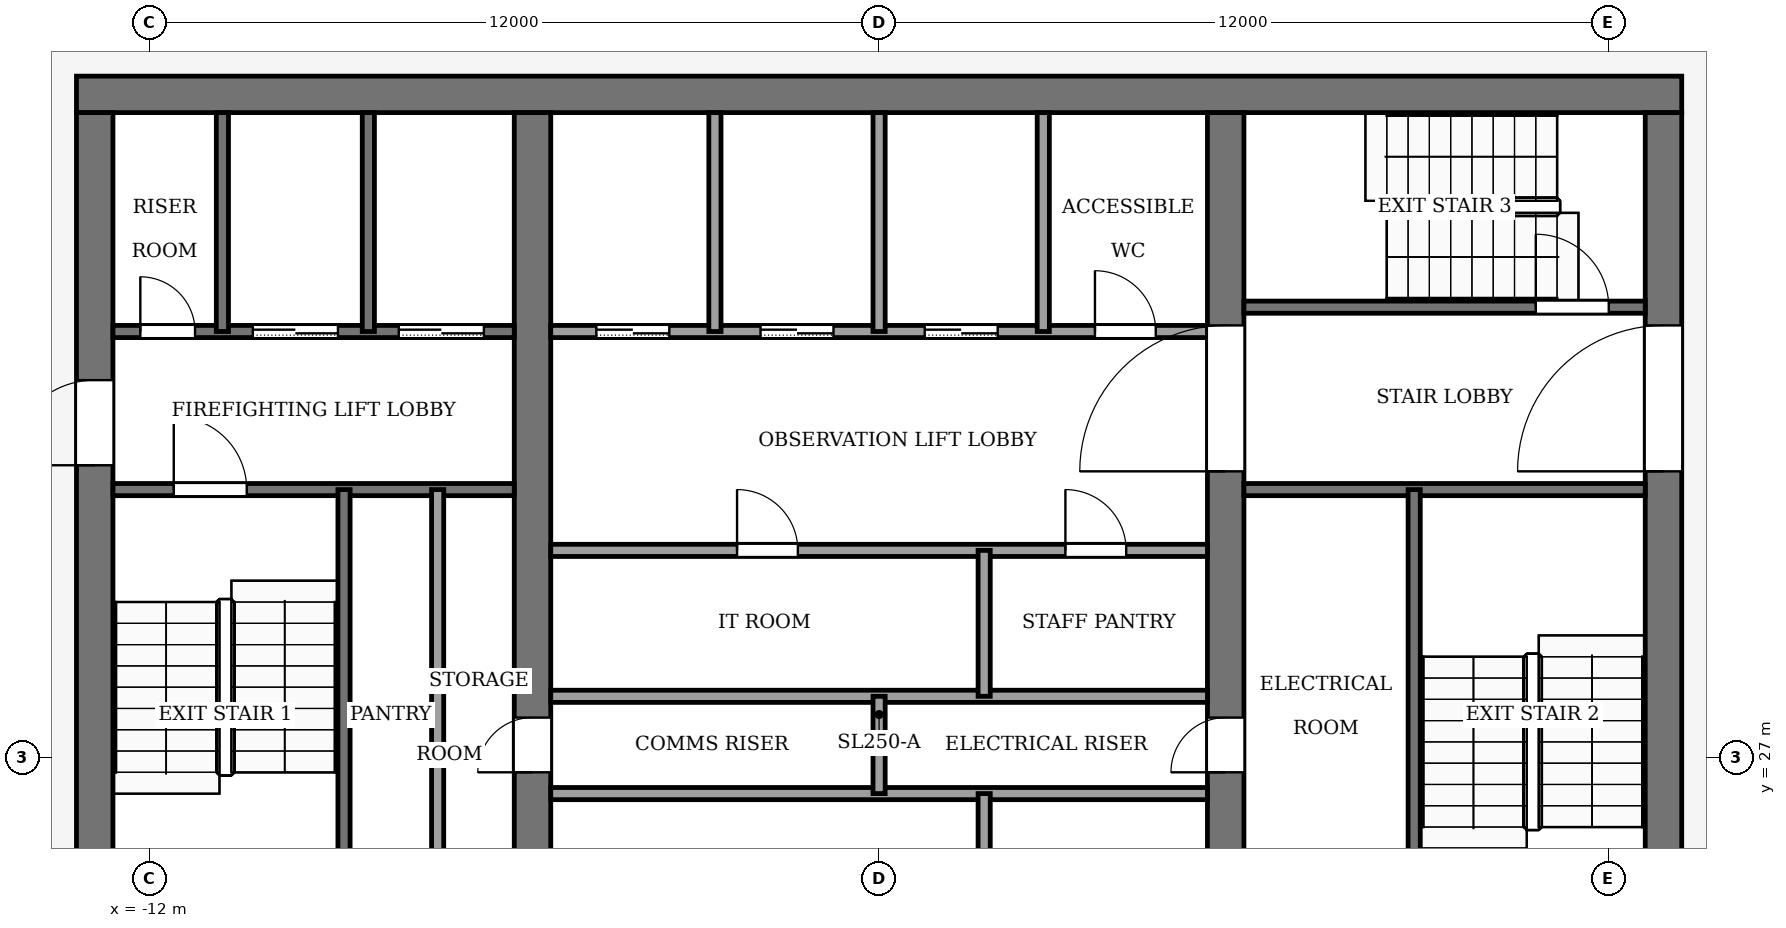
"""IFC4 building model, lengths in metres.
Left out: names, types, materials, properties, quantities, classifications, styles, units other than length and angle.
Written with IfcOpenShell. Run it as: python <this file> out.ifc"""

import sys

from ifc_helpers import new_model, si_unit, direction, frame, frame_2d, origin, place, context, subcontext, project, spatial, rectangle, extrude, element, fill, save


model = new_model("IFC4")
c1 = context("Model", 3, precision=1e-05, world=origin(), true_north=direction((0.0, 1.0)))
c2 = subcontext(c1, "Body", "Model", "MODEL_VIEW")
j1 = project(units=[si_unit("LENGTHUNIT", "METRE"), si_unit("PLANEANGLEUNIT", "RADIAN")], contexts=[c1])
p1 = place(None, origin())
s1 = spatial("IfcSite", under=j1, at=p1, CompositionType="ELEMENT")
p2 = place(p1, origin())
s2 = spatial("IfcBuilding", under=s1, at=p2, CompositionType="ELEMENT")
p3 = place(p2, frame((0.0, 0.0, 334.0)))
s3 = spatial("IfcBuildingStorey", under=s2, at=p3, CompositionType="ELEMENT", Elevation=334.0)
p4 = place(p3, frame((-13.2, 37.9, -0.18), z_axis=(0.0, 0.0, 1.0), x_axis=(1.0, 0.0, 0.0)))
e1 = element("IfcWall", 1, at=p4, inside=s3, PredefinedType="SHEAR", context=c2, shape_type="SweptSolid", body=[
    extrude(rectangle(XDim=26.4, YDim=0.6, at=frame_2d((13.2, 0.0))), origin(), (0.0, 0.0, 1.0), 6.53),
])
p5 = place(p3, frame((-12.9, 18.4, -0.18), z_axis=(0.0, 0.0, 1.0), x_axis=(0.0, 1.0, 0.0)))
e2 = element("IfcWall", 2, at=p5, inside=s3, PredefinedType="SHEAR", context=c2, shape_type="SweptSolid", body=[
    extrude(rectangle(XDim=19.2, YDim=0.6, at=frame_2d((9.6, 0.0))), origin(), (0.0, 0.0, 1.0), 6.53),
])
p6 = place(p5, frame((2.8, 0.0, 0.18)))
e3 = element("IfcOpeningElement", 3, at=p6, cuts=e2, PredefinedType="OPENING", context=c2, shape_type="SweptSolid", body=[
    extrude(rectangle(XDim=2.4, YDim=2.4, at=frame_2d((1.2, 1.2))), frame((0.0, 0.31, 0.0), z_axis=(0.0, -1.0, 0.0), x_axis=(1.0, 0.0, 0.0)), (0.0, 0.0, 1.0), 0.62),
])
p7 = place(p5, frame((13.4, 0.0, 0.18)))
e4 = element("IfcOpeningElement", 4, at=p7, cuts=e2, PredefinedType="OPENING", context=c2, shape_type="SweptSolid", body=[
    extrude(rectangle(XDim=1.4, YDim=2.2, at=frame_2d((0.7, 1.1))), frame((0.0, 0.31, 0.0), z_axis=(0.0, -1.0, 0.0), x_axis=(1.0, 0.0, 0.0)), (0.0, 0.0, 1.0), 0.62),
])
p8 = place(p3, frame((12.9, 18.4, -0.18), z_axis=(0.0, 0.0, 1.0), x_axis=(0.0, 1.0, 0.0)))
e5 = element("IfcWall", 5, at=p8, inside=s3, PredefinedType="SHEAR", context=c2, shape_type="SweptSolid", body=[
    extrude(rectangle(XDim=19.2, YDim=0.6, at=frame_2d((9.6, 0.0))), origin(), (0.0, 0.0, 1.0), 6.53),
])
p9 = place(p8, frame((2.8, 0.0, 0.18)))
e6 = element("IfcOpeningElement", 6, at=p9, cuts=e5, PredefinedType="OPENING", context=c2, shape_type="SweptSolid", body=[
    extrude(rectangle(XDim=2.4, YDim=2.4, at=frame_2d((1.2, 1.2))), frame((0.0, 0.31, 0.0), z_axis=(0.0, -1.0, 0.0), x_axis=(1.0, 0.0, 0.0)), (0.0, 0.0, 1.0), 0.62),
])
p10 = place(p8, frame((13.3, 0.0, 0.18)))
e7 = element("IfcOpeningElement", 7, at=p10, cuts=e5, PredefinedType="OPENING", context=c2, shape_type="SweptSolid", body=[
    extrude(rectangle(XDim=2.4, YDim=2.4, at=frame_2d((1.2, 1.2))), frame((0.0, 0.31, 0.0), z_axis=(0.0, -1.0, 0.0), x_axis=(1.0, 0.0, 0.0)), (0.0, 0.0, 1.0), 0.62),
])
p11 = place(p3, frame((-5.7, 18.4, -0.18), z_axis=(0.0, 0.0, 1.0), x_axis=(0.0, 1.0, 0.0)))
e8 = element("IfcWall", 8, at=p11, inside=s3, PredefinedType="SHEAR", context=c2, shape_type="SweptSolid", body=[
    extrude(rectangle(XDim=19.2, YDim=0.6, at=frame_2d((9.6, 0.0))), origin(), (0.0, 0.0, 1.0), 6.53),
])
p12 = place(p11, frame((8.35, 0.0, 0.18)))
e9 = element("IfcOpeningElement", 9, at=p12, cuts=e8, PredefinedType="OPENING", context=c2, shape_type="SweptSolid", body=[
    extrude(rectangle(XDim=0.9, YDim=2.1, at=frame_2d((0.45, 1.05))), frame((0.0, 0.31, 0.0), z_axis=(0.0, -1.0, 0.0), x_axis=(1.0, 0.0, 0.0)), (0.0, 0.0, 1.0), 0.62),
])
p13 = place(p3, frame((5.7, 18.4, -0.18), z_axis=(0.0, 0.0, 1.0), x_axis=(0.0, 1.0, 0.0)))
e10 = element("IfcWall", 10, at=p13, inside=s3, PredefinedType="SHEAR", context=c2, shape_type="SweptSolid", body=[
    extrude(rectangle(XDim=19.2, YDim=0.6, at=frame_2d((9.6, 0.0))), origin(), (0.0, 0.0, 1.0), 6.53),
])
p14 = place(p13, frame((8.35, 0.0, 0.18)))
e11 = element("IfcOpeningElement", 11, at=p14, cuts=e10, PredefinedType="OPENING", context=c2, shape_type="SweptSolid", body=[
    extrude(rectangle(XDim=0.9, YDim=2.1, at=frame_2d((0.45, 1.05))), frame((0.0, 0.31, 0.0), z_axis=(0.0, -1.0, 0.0), x_axis=(1.0, 0.0, 0.0)), (0.0, 0.0, 1.0), 0.62),
])
p15 = place(p13, frame((13.3, 0.0, 0.18)))
e12 = element("IfcOpeningElement", 12, at=p15, cuts=e10, PredefinedType="OPENING", context=c2, shape_type="SweptSolid", body=[
    extrude(rectangle(XDim=2.4, YDim=2.4, at=frame_2d((1.2, 1.2))), frame((0.0, 0.31, 0.0), z_axis=(0.0, -1.0, 0.0), x_axis=(1.0, 0.0, 0.0)), (0.0, 0.0, 1.0), 0.62),
])
for number, where, z_axis, x_axis in (
    (13, (-5.4, 26.4, 0.0), (0.0, 0.0, 1.0), (1.0, 0.0, 0.0)),
    (14, (-5.4, 28.0, 0.0), (0.0, 0.0, 1.0), (1.0, 0.0, 0.0)),
):
    element("IfcWall", number, at=place(p3, frame(where, z_axis=z_axis, x_axis=x_axis)), inside=s3, PredefinedType="PARTITIONING", context=c2, shape_type="SweptSolid", body=[
        extrude(rectangle(XDim=10.8, YDim=0.2, at=frame_2d((5.4, 0.0))), origin(), (0.0, 0.0, 1.0), 6.35),
    ])
p16 = place(p3, frame((-5.4, 30.4, 0.0), z_axis=(0.0, 0.0, 1.0), x_axis=(1.0, 0.0, 0.0)))
e15 = element("IfcWall", 15, at=p16, inside=s3, PredefinedType="PARTITIONING", context=c2, shape_type="SweptSolid", body=[
    extrude(rectangle(XDim=10.8, YDim=0.2, at=frame_2d((5.4, 0.0))), origin(), (0.0, 0.0, 1.0), 6.35),
])
p17 = place(p16, frame((3.064, 0.0, 0.0)))
e16 = element("IfcOpeningElement", 16, at=p17, cuts=e15, PredefinedType="OPENING", context=c2, shape_type="SweptSolid", body=[
    extrude(rectangle(XDim=1.0, YDim=2.1, at=frame_2d((0.5, 1.05))), frame((0.0, 0.11, 0.0), z_axis=(0.0, -1.0, 0.0), x_axis=(1.0, 0.0, 0.0)), (0.0, 0.0, 1.0), 0.22),
])
p18 = place(p16, frame((8.464, 0.0, 0.0)))
e17 = element("IfcOpeningElement", 17, at=p18, cuts=e15, PredefinedType="OPENING", context=c2, shape_type="SweptSolid", body=[
    extrude(rectangle(XDim=1.0, YDim=2.1, at=frame_2d((0.5, 1.05))), frame((0.0, 0.11, 0.0), z_axis=(0.0, -1.0, 0.0), x_axis=(1.0, 0.0, 0.0)), (0.0, 0.0, 1.0), 0.22),
])
p19 = place(p3, frame((-12.6, 31.4, 0.0), z_axis=(0.0, 0.0, 1.0), x_axis=(1.0, 0.0, 0.0)))
e18 = element("IfcWall", 18, at=p19, inside=s3, PredefinedType="PARTITIONING", context=c2, shape_type="SweptSolid", body=[
    extrude(rectangle(XDim=6.6, YDim=0.2, at=frame_2d((3.3, 0.0))), origin(), (0.0, 0.0, 1.0), 6.35),
])
p20 = place(p19, frame((1.0, 0.0, 0.0)))
e19 = element("IfcOpeningElement", 19, at=p20, cuts=e18, PredefinedType="OPENING", context=c2, shape_type="SweptSolid", body=[
    extrude(rectangle(XDim=1.2, YDim=2.2, at=frame_2d((0.6, 1.1))), frame((0.0, 0.11, 0.0), z_axis=(0.0, -1.0, 0.0), x_axis=(1.0, 0.0, 0.0)), (0.0, 0.0, 1.0), 0.22),
])
p21 = place(p3, frame((6.0, 31.4, 0.0), z_axis=(0.0, 0.0, 1.0), x_axis=(1.0, 0.0, 0.0)))
e20 = element("IfcWall", 20, at=p21, inside=s3, PredefinedType="PARTITIONING", context=c2, shape_type="SweptSolid", body=[
    extrude(rectangle(XDim=6.6, YDim=0.2, at=frame_2d((3.3, 0.0))), origin(), (0.0, 0.0, 1.0), 6.35),
])
p22 = place(p3, frame((-12.6, 34.0, 0.0), z_axis=(0.0, 0.0, 1.0), x_axis=(1.0, 0.0, 0.0)))
e21 = element("IfcWall", 21, at=p22, inside=s3, PredefinedType="PARTITIONING", context=c2, shape_type="SweptSolid", body=[
    extrude(rectangle(XDim=6.6, YDim=0.2, at=frame_2d((3.3, 0.0))), origin(), (0.0, 0.0, 1.0), 6.35),
])
p23 = place(p22, frame((4.7, 0.0, 0.0)))
e22 = element("IfcOpeningElement", 22, at=p23, cuts=e21, PredefinedType="OPENING", context=c2, shape_type="SweptSolid", body=[
    extrude(rectangle(XDim=1.4, YDim=2.2, at=frame_2d((0.7, 1.1))), frame((0.0, 0.11, 0.0), z_axis=(0.0, -1.0, 0.0), x_axis=(1.0, 0.0, 0.0)), (0.0, 0.0, 1.0), 0.22),
])
p24 = place(p22, frame((2.3, 0.0, 0.0)))
e23 = element("IfcOpeningElement", 23, at=p24, cuts=e21, PredefinedType="OPENING", context=c2, shape_type="SweptSolid", body=[
    extrude(rectangle(XDim=1.4, YDim=2.2, at=frame_2d((0.7, 1.1))), frame((0.0, 0.11, 0.0), z_axis=(0.0, -1.0, 0.0), x_axis=(1.0, 0.0, 0.0)), (0.0, 0.0, 1.0), 0.22),
])
p25 = place(p22, frame((0.45, 0.0, 0.0)))
e24 = element("IfcOpeningElement", 24, at=p25, cuts=e21, PredefinedType="OPENING", context=c2, shape_type="SweptSolid", body=[
    extrude(rectangle(XDim=0.9, YDim=2.1, at=frame_2d((0.45, 1.05))), frame((0.0, 0.11, 0.0), z_axis=(0.0, -1.0, 0.0), x_axis=(1.0, 0.0, 0.0)), (0.0, 0.0, 1.0), 0.22),
])
p26 = place(p3, frame((-5.4, 34.0, 0.0), z_axis=(0.0, 0.0, 1.0), x_axis=(1.0, 0.0, 0.0)))
e25 = element("IfcWall", 25, at=p26, inside=s3, PredefinedType="PARTITIONING", context=c2, shape_type="SweptSolid", body=[
    extrude(rectangle(XDim=10.8, YDim=0.2, at=frame_2d((5.4, 0.0))), origin(), (0.0, 0.0, 1.0), 6.35),
])
p27 = place(p26, frame((0.75, 0.0, 0.0)))
e26 = element("IfcOpeningElement", 26, at=p27, cuts=e25, PredefinedType="OPENING", context=c2, shape_type="SweptSolid", body=[
    extrude(rectangle(XDim=1.2, YDim=2.2, at=frame_2d((0.6, 1.1))), frame((0.0, 0.11, 0.0), z_axis=(0.0, -1.0, 0.0), x_axis=(1.0, 0.0, 0.0)), (0.0, 0.0, 1.0), 0.22),
])
p28 = place(p26, frame((3.45, 0.0, 0.0)))
e27 = element("IfcOpeningElement", 27, at=p28, cuts=e25, PredefinedType="OPENING", context=c2, shape_type="SweptSolid", body=[
    extrude(rectangle(XDim=1.2, YDim=2.2, at=frame_2d((0.6, 1.1))), frame((0.0, 0.11, 0.0), z_axis=(0.0, -1.0, 0.0), x_axis=(1.0, 0.0, 0.0)), (0.0, 0.0, 1.0), 0.22),
])
p29 = place(p26, frame((6.15, 0.0, 0.0)))
e28 = element("IfcOpeningElement", 28, at=p29, cuts=e25, PredefinedType="OPENING", context=c2, shape_type="SweptSolid", body=[
    extrude(rectangle(XDim=1.2, YDim=2.2, at=frame_2d((0.6, 1.1))), frame((0.0, 0.11, 0.0), z_axis=(0.0, -1.0, 0.0), x_axis=(1.0, 0.0, 0.0)), (0.0, 0.0, 1.0), 0.22),
])
p30 = place(p26, frame((8.95, 0.0, 0.0)))
e29 = element("IfcOpeningElement", 29, at=p30, cuts=e25, PredefinedType="OPENING", context=c2, shape_type="SweptSolid", body=[
    extrude(rectangle(XDim=1.0, YDim=2.1, at=frame_2d((0.5, 1.05))), frame((0.0, 0.11, 0.0), z_axis=(0.0, -1.0, 0.0), x_axis=(1.0, 0.0, 0.0)), (0.0, 0.0, 1.0), 0.22),
])
p31 = place(p3, frame((6.0, 34.4, 0.0), z_axis=(0.0, 0.0, 1.0), x_axis=(1.0, 0.0, 0.0)))
e30 = element("IfcWall", 30, at=p31, inside=s3, PredefinedType="PARTITIONING", context=c2, shape_type="SweptSolid", body=[
    extrude(rectangle(XDim=6.6, YDim=0.2, at=frame_2d((3.3, 0.0))), origin(), (0.0, 0.0, 1.0), 6.35),
])
p32 = place(p31, frame((4.8, 0.0, 0.0)))
e31 = element("IfcOpeningElement", 31, at=p32, cuts=e30, PredefinedType="OPENING", context=c2, shape_type="SweptSolid", body=[
    extrude(rectangle(XDim=1.2, YDim=2.2, at=frame_2d((0.6, 1.1))), frame((0.0, 0.11, 0.0), z_axis=(0.0, -1.0, 0.0), x_axis=(1.0, 0.0, 0.0)), (0.0, 0.0, 1.0), 0.22),
])
p33 = place(p3, frame((-10.8, 34.0, 0.0), z_axis=(0.0, 0.0, 1.0), x_axis=(0.0, 1.0, 0.0)))
e32 = element("IfcWall", 32, at=p33, inside=s3, PredefinedType="PARTITIONING", context=c2, shape_type="SweptSolid", body=[
    extrude(rectangle(XDim=3.6, YDim=0.2, at=frame_2d((1.8, 0.0))), origin(), (0.0, 0.0, 1.0), 6.35),
])
p34 = place(p3, frame((-8.8, 24.0, 0.0), z_axis=(0.0, 0.0, 1.0), x_axis=(0.0, 1.0, 0.0)))
e33 = element("IfcWall", 33, at=p34, inside=s3, PredefinedType="PARTITIONING", context=c2, shape_type="SweptSolid", body=[
    extrude(rectangle(XDim=7.4, YDim=0.2, at=frame_2d((3.7, 0.0))), origin(), (0.0, 0.0, 1.0), 6.35),
])
p35 = place(p3, frame((-8.4, 34.0, 0.0), z_axis=(0.0, 0.0, 1.0), x_axis=(0.0, 1.0, 0.0)))
e34 = element("IfcWall", 34, at=p35, inside=s3, PredefinedType="PARTITIONING", context=c2, shape_type="SweptSolid", body=[
    extrude(rectangle(XDim=3.6, YDim=0.2, at=frame_2d((1.8, 0.0))), origin(), (0.0, 0.0, 1.0), 6.35),
])
p36 = place(p3, frame((-7.26, 24.0, 0.0), z_axis=(0.0, 0.0, 1.0), x_axis=(0.0, 1.0, 0.0)))
e35 = element("IfcWall", 35, at=p36, inside=s3, PredefinedType="PARTITIONING", context=c2, shape_type="SweptSolid", body=[
    extrude(rectangle(XDim=7.4, YDim=0.2, at=frame_2d((3.7, 0.0))), origin(), (0.0, 0.0, 1.0), 6.35),
])
p37 = place(p3, frame((-2.7, 34.0, 0.0), z_axis=(0.0, 0.0, 1.0), x_axis=(0.0, 1.0, 0.0)))
e36 = element("IfcWall", 36, at=p37, inside=s3, PredefinedType="PARTITIONING", context=c2, shape_type="SweptSolid", body=[
    extrude(rectangle(XDim=3.6, YDim=0.2, at=frame_2d((1.8, 0.0))), origin(), (0.0, 0.0, 1.0), 6.35),
])
p38 = place(p3, frame((0.0, 26.4, 0.0), z_axis=(0.0, 0.0, 1.0), x_axis=(0.0, 1.0, 0.0)))
e37 = element("IfcWall", 37, at=p38, inside=s3, PredefinedType="PARTITIONING", context=c2, shape_type="SweptSolid", body=[
    extrude(rectangle(XDim=1.6, YDim=0.2, at=frame_2d((0.8, 0.0))), origin(), (0.0, 0.0, 1.0), 6.35),
])
p39 = place(p3, frame((0.0, 34.0, 0.0), z_axis=(0.0, 0.0, 1.0), x_axis=(0.0, 1.0, 0.0)))
e38 = element("IfcWall", 38, at=p39, inside=s3, PredefinedType="PARTITIONING", context=c2, shape_type="SweptSolid", body=[
    extrude(rectangle(XDim=3.6, YDim=0.2, at=frame_2d((1.8, 0.0))), origin(), (0.0, 0.0, 1.0), 6.35),
])
for number, where, z_axis, x_axis in (
    (39, (1.728, 24.0, 0.0), (0.0, 0.0, 1.0), (0.0, 1.0, 0.0)),
    (40, (1.728, 28.0, 0.0), (0.0, 0.0, 1.0), (0.0, 1.0, 0.0)),
):
    element("IfcWall", number, at=place(p3, frame(where, z_axis=z_axis, x_axis=x_axis)), inside=s3, PredefinedType="PARTITIONING", context=c2, shape_type="SweptSolid", body=[
        extrude(rectangle(XDim=2.4, YDim=0.2, at=frame_2d((1.2, 0.0))), origin(), (0.0, 0.0, 1.0), 6.35),
    ])
p40 = place(p3, frame((2.7, 34.0, 0.0), z_axis=(0.0, 0.0, 1.0), x_axis=(0.0, 1.0, 0.0)))
e41 = element("IfcWall", 41, at=p40, inside=s3, PredefinedType="PARTITIONING", context=c2, shape_type="SweptSolid", body=[
    extrude(rectangle(XDim=3.6, YDim=0.2, at=frame_2d((1.8, 0.0))), origin(), (0.0, 0.0, 1.0), 6.35),
])
p41 = place(p3, frame((8.8, 24.0, 0.0), z_axis=(0.0, 0.0, 1.0), x_axis=(0.0, 1.0, 0.0)))
e42 = element("IfcWall", 42, at=p41, inside=s3, PredefinedType="PARTITIONING", context=c2, shape_type="SweptSolid", body=[
    extrude(rectangle(XDim=7.4, YDim=0.2, at=frame_2d((3.7, 0.0))), origin(), (0.0, 0.0, 1.0), 6.35),
])
p42 = place(p27, origin())
e43 = element("IfcDoor", 43, at=p42, inside=s3, OperationType="SLIDING_TO_LEFT", PredefinedType="DOOR", context=c2, shape_type="SweptSolid", body=[
    extrude(rectangle(XDim=1.2, YDim=2.2, at=frame_2d((0.6, 1.1))), frame((0.0, 0.025, 0.0), z_axis=(0.0, -1.0, 0.0), x_axis=(1.0, 0.0, 0.0)), (0.0, 0.0, 1.0), 0.05),
])
fill(e26, e43)
p43 = place(p28, origin())
e44 = element("IfcDoor", 44, at=p43, inside=s3, OperationType="SLIDING_TO_LEFT", PredefinedType="DOOR", context=c2, shape_type="SweptSolid", body=[
    extrude(rectangle(XDim=1.2, YDim=2.2, at=frame_2d((0.6, 1.1))), frame((0.0, 0.025, 0.0), z_axis=(0.0, -1.0, 0.0), x_axis=(1.0, 0.0, 0.0)), (0.0, 0.0, 1.0), 0.05),
])
fill(e27, e44)
p44 = place(p29, origin())
e45 = element("IfcDoor", 45, at=p44, inside=s3, OperationType="SLIDING_TO_LEFT", PredefinedType="DOOR", context=c2, shape_type="SweptSolid", body=[
    extrude(rectangle(XDim=1.2, YDim=2.2, at=frame_2d((0.6, 1.1))), frame((0.0, 0.025, 0.0), z_axis=(0.0, -1.0, 0.0), x_axis=(1.0, 0.0, 0.0)), (0.0, 0.0, 1.0), 0.05),
])
fill(e28, e45)
p45 = place(p23, origin())
e46 = element("IfcDoor", 46, at=p45, inside=s3, OperationType="SLIDING_TO_LEFT", PredefinedType="DOOR", context=c2, shape_type="SweptSolid", body=[
    extrude(rectangle(XDim=1.4, YDim=2.2, at=frame_2d((0.7, 1.1))), frame((0.0, 0.025, 0.0), z_axis=(0.0, -1.0, 0.0), x_axis=(1.0, 0.0, 0.0)), (0.0, 0.0, 1.0), 0.05),
])
fill(e22, e46)
p46 = place(p24, origin())
e47 = element("IfcDoor", 47, at=p46, inside=s3, OperationType="SLIDING_TO_LEFT", PredefinedType="DOOR", context=c2, shape_type="SweptSolid", body=[
    extrude(rectangle(XDim=1.4, YDim=2.2, at=frame_2d((0.7, 1.1))), frame((0.0, 0.025, 0.0), z_axis=(0.0, -1.0, 0.0), x_axis=(1.0, 0.0, 0.0)), (0.0, 0.0, 1.0), 0.05),
])
fill(e23, e47)
p47 = place(p25, origin())
e48 = element("IfcDoor", 48, at=p47, inside=s3, OperationType="SINGLE_SWING_RIGHT", PredefinedType="DOOR", context=c2, shape_type="SweptSolid", body=[
    extrude(rectangle(XDim=0.9, YDim=2.1, at=frame_2d((0.45, 1.05))), frame((0.0, 0.025, 0.0), z_axis=(0.0, -1.0, 0.0), x_axis=(1.0, 0.0, 0.0)), (0.0, 0.0, 1.0), 0.05),
])
fill(e24, e48)
p48 = place(p17, origin())
e49 = element("IfcDoor", 49, at=p48, inside=s3, OperationType="SINGLE_SWING_RIGHT", PredefinedType="DOOR", context=c2, shape_type="SweptSolid", body=[
    extrude(rectangle(XDim=1.0, YDim=2.1, at=frame_2d((0.5, 1.05))), frame((0.0, 0.025, 0.0), z_axis=(0.0, -1.0, 0.0), x_axis=(1.0, 0.0, 0.0)), (0.0, 0.0, 1.0), 0.05),
])
fill(e16, e49)
p49 = place(p18, origin())
e50 = element("IfcDoor", 50, at=p49, inside=s3, OperationType="SINGLE_SWING_LEFT", PredefinedType="DOOR", context=c2, shape_type="SweptSolid", body=[
    extrude(rectangle(XDim=1.0, YDim=2.1, at=frame_2d((0.5, 1.05))), frame((0.0, 0.025, 0.0), z_axis=(0.0, -1.0, 0.0), x_axis=(1.0, 0.0, 0.0)), (0.0, 0.0, 1.0), 0.05),
])
fill(e17, e50)
p50 = place(p30, origin())
e51 = element("IfcDoor", 51, at=p50, inside=s3, OperationType="SINGLE_SWING_LEFT", PredefinedType="DOOR", context=c2, shape_type="SweptSolid", body=[
    extrude(rectangle(XDim=1.0, YDim=2.1, at=frame_2d((0.5, 1.05))), frame((0.0, 0.025, 0.0), z_axis=(0.0, -1.0, 0.0), x_axis=(1.0, 0.0, 0.0)), (0.0, 0.0, 1.0), 0.05),
])
fill(e29, e51)
p51 = place(p12, origin())
e52 = element("IfcDoor", 52, at=p51, inside=s3, OperationType="SINGLE_SWING_LEFT", PredefinedType="DOOR", context=c2, shape_type="SweptSolid", body=[
    extrude(rectangle(XDim=0.9, YDim=2.1, at=frame_2d((0.45, 1.05))), frame((0.0, 0.025, 0.0), z_axis=(0.0, -1.0, 0.0), x_axis=(1.0, 0.0, 0.0)), (0.0, 0.0, 1.0), 0.05),
])
fill(e9, e52)
p52 = place(p14, origin())
e53 = element("IfcDoor", 53, at=p52, inside=s3, OperationType="SINGLE_SWING_RIGHT", PredefinedType="DOOR", context=c2, shape_type="SweptSolid", body=[
    extrude(rectangle(XDim=0.9, YDim=2.1, at=frame_2d((0.45, 1.05))), frame((0.0, 0.025, 0.0), z_axis=(0.0, -1.0, 0.0), x_axis=(1.0, 0.0, 0.0)), (0.0, 0.0, 1.0), 0.05),
])
fill(e11, e53)
p53 = place(p20, origin())
e54 = element("IfcDoor", 54, at=p53, inside=s3, OperationType="SINGLE_SWING_RIGHT", PredefinedType="DOOR", context=c2, shape_type="SweptSolid", body=[
    extrude(rectangle(XDim=1.2, YDim=2.2, at=frame_2d((0.6, 1.1))), frame((0.0, 0.025, 0.0), z_axis=(0.0, -1.0, 0.0), x_axis=(1.0, 0.0, 0.0)), (0.0, 0.0, 1.0), 0.05),
])
fill(e19, e54)
p54 = place(p32, origin())
e55 = element("IfcDoor", 55, at=p54, inside=s3, OperationType="SINGLE_SWING_RIGHT", PredefinedType="DOOR", context=c2, shape_type="SweptSolid", body=[
    extrude(rectangle(XDim=1.2, YDim=2.2, at=frame_2d((0.6, 1.1))), frame((0.0, 0.025, 0.0), z_axis=(0.0, -1.0, 0.0), x_axis=(1.0, 0.0, 0.0)), (0.0, 0.0, 1.0), 0.05),
])
fill(e31, e55)
p55 = place(p15, origin())
e56 = element("IfcDoor", 56, at=p55, inside=s3, OperationType="DOUBLE_DOOR_SINGLE_SWING", PredefinedType="DOOR", context=c2, shape_type="SweptSolid", body=[
    extrude(rectangle(XDim=2.4, YDim=2.4, at=frame_2d((1.2, 1.2))), frame((0.0, 0.025, 0.0), z_axis=(0.0, -1.0, 0.0), x_axis=(1.0, 0.0, 0.0)), (0.0, 0.0, 1.0), 0.05),
])
fill(e12, e56)
p56 = place(p10, origin())
e57 = element("IfcDoor", 57, at=p56, inside=s3, OperationType="DOUBLE_DOOR_SINGLE_SWING", PredefinedType="DOOR", context=c2, shape_type="SweptSolid", body=[
    extrude(rectangle(XDim=2.4, YDim=2.4, at=frame_2d((1.2, 1.2))), frame((0.0, 0.025, 0.0), z_axis=(0.0, -1.0, 0.0), x_axis=(1.0, 0.0, 0.0)), (0.0, 0.0, 1.0), 0.05),
])
fill(e7, e57)
p57 = place(p7, origin())
e58 = element("IfcDoor", 58, at=p57, inside=s3, OperationType="SINGLE_SWING_RIGHT", PredefinedType="DOOR", context=c2, shape_type="SweptSolid", body=[
    extrude(rectangle(XDim=1.4, YDim=2.2, at=frame_2d((0.7, 1.1))), frame((0.0, 0.025, 0.0), z_axis=(0.0, -1.0, 0.0), x_axis=(1.0, 0.0, 0.0)), (0.0, 0.0, 1.0), 0.05),
])
fill(e4, e58)
save(model, sys.argv[1])
